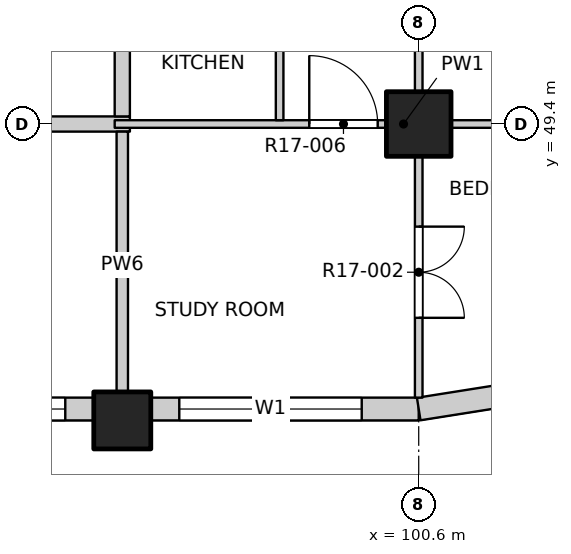
"""IFC4 building model, lengths in metres.
Left out: names, types, materials, properties, quantities, classifications, styles, units other than length and angle.
Written with IfcOpenShell. Run it as: python <this file> out.ifc"""

import sys

from ifc_helpers import new_model, si_unit, direction, frame, frame_2d, origin, origin_2d, place, context, subcontext, project, spatial, rectangle, extrude, element, fill, save


model = new_model("IFC4")
c1 = context("Model", 3, precision=1e-05, world=origin(), true_north=direction((0.0, 1.0)))
c2 = subcontext(c1, "Body", "Model", "MODEL_VIEW")
j1 = project(units=[si_unit("LENGTHUNIT", "METRE"), si_unit("PLANEANGLEUNIT", "RADIAN")], contexts=[c1])
p1 = place(None, origin())
s1 = spatial("IfcSite", under=j1, at=p1, CompositionType="ELEMENT")
p2 = place(p1, origin())
s2 = spatial("IfcBuilding", under=s1, at=p2, CompositionType="ELEMENT")
p3 = place(p2, frame((0.0, 0.0, 179.2)))
s3 = spatial("IfcBuildingStorey", under=s2, at=p3, CompositionType="ELEMENT", Elevation=179.2)
p4 = place(p3, frame((96.7, 45.5, -0.3), z_axis=(0.0, 0.0, 1.0), x_axis=(1.0, 0.0, 0.0)))
e1 = element("IfcColumn", 1, at=p4, inside=s3, PredefinedType="COLUMN", context=c2, shape_type="SweptSolid", body=[
    extrude(rectangle(XDim=0.75, YDim=0.75, at=origin_2d()), origin(), (0.0, 0.0, 1.0), 3.45),
])
p5 = place(p3, frame((100.6, 49.4, -0.3), z_axis=(0.0, 0.0, 1.0), x_axis=(1.0, 0.0, 0.0)))
e2 = element("IfcColumn", 2, at=p5, inside=s3, PredefinedType="COLUMN", context=c2, shape_type="SweptSolid", body=[
    extrude(rectangle(XDim=0.85, YDim=0.85, at=origin_2d()), origin(), (0.0, 0.0, 1.0), 3.45),
])
p6 = place(p3, frame((89.275, 45.65, 0.0), z_axis=(0.0, 0.0, 1.0), x_axis=(1.0, 0.0, 0.0)))
e3 = element("IfcWall", 3, at=p6, inside=s3, PredefinedType="SOLIDWALL", context=c2, shape_type="SweptSolid", body=[
    extrude(rectangle(XDim=7.05, YDim=0.3, at=frame_2d((3.525, 0.0))), origin(), (0.0, 0.0, 1.0), 2.7),
])
p7 = place(p6, frame((0.375, 0.0, 0.9)))
e4 = element("IfcOpeningElement", 4, at=p7, cuts=e3, PredefinedType="OPENING", context=c2, shape_type="SweptSolid", body=[
    extrude(rectangle(XDim=2.4, YDim=1.8, at=frame_2d((1.2, 0.9))), frame((0.0, 0.16, 0.0), z_axis=(0.0, -1.0, 0.0), x_axis=(1.0, 0.0, 0.0)), (0.0, 0.0, 1.0), 0.32),
])
p8 = place(p6, frame((4.275, 0.0, 0.9)))
e5 = element("IfcOpeningElement", 5, at=p8, cuts=e3, PredefinedType="OPENING", context=c2, shape_type="SweptSolid", body=[
    extrude(rectangle(XDim=2.4, YDim=1.8, at=frame_2d((1.2, 0.9))), frame((0.0, 0.16, 0.0), z_axis=(0.0, -1.0, 0.0), x_axis=(1.0, 0.0, 0.0)), (0.0, 0.0, 1.0), 0.32),
])
p9 = place(p3, frame((97.075, 45.65, 0.0), z_axis=(0.0, 0.0, 1.0), x_axis=(1.0, 0.0, 0.0)))
e6 = element("IfcWall", 6, at=p9, inside=s3, PredefinedType="SOLIDWALL", context=c2, shape_type="SweptSolid", body=[
    extrude(rectangle(XDim=3.525, YDim=0.3, at=frame_2d((1.763, 0.0))), origin(), (0.0, 0.0, 1.0), 2.7),
])
p10 = place(p9, frame((0.375, 0.0, 0.9)))
e7 = element("IfcOpeningElement", 7, at=p10, cuts=e6, PredefinedType="OPENING", context=c2, shape_type="SweptSolid", body=[
    extrude(rectangle(XDim=2.4, YDim=1.8, at=frame_2d((1.2, 0.9))), frame((0.0, 0.16, 0.0), z_axis=(0.0, -1.0, 0.0), x_axis=(1.0, 0.0, 0.0)), (0.0, 0.0, 1.0), 0.32),
])
p11 = place(p3, frame((100.6, 45.65, 0.0), z_axis=(0.0, 0.0, 1.0), x_axis=(0.987678452879, 0.156496880861, 0.0)))
e8 = element("IfcWall", 8, at=p11, inside=s3, PredefinedType="SOLIDWALL", context=c2, shape_type="SweptSolid", body=[
    extrude(rectangle(XDim=1.173, YDim=0.3, at=frame_2d((0.586, 0.0))), origin(), (0.0, 0.0, 1.0), 2.7),
])
p12 = place(p3, frame((73.2, 49.4, 0.0), z_axis=(0.0, 0.0, 1.0), x_axis=(1.0, 0.0, 0.0)))
e9 = element("IfcWall", 9, at=p12, inside=s3, PredefinedType="PARTITIONING", context=c2, shape_type="SweptSolid", body=[
    extrude(rectangle(XDim=23.6, YDim=0.2, at=frame_2d((11.8, 0.0))), origin(), (0.0, 0.0, 1.0), 3.15),
])
p13 = place(p12, frame((7.3, 0.0, 0.0)))
e10 = element("IfcOpeningElement", 10, at=p13, cuts=e9, PredefinedType="OPENING", context=c2, shape_type="SweptSolid", body=[
    extrude(rectangle(XDim=1.2, YDim=2.1, at=frame_2d((0.6, 1.05))), frame((0.0, 0.11, 0.0), z_axis=(0.0, -1.0, 0.0), x_axis=(1.0, 0.0, 0.0)), (0.0, 0.0, 1.0), 0.22),
])
p14 = place(p12, frame((20.125, 0.0, 0.0)))
e11 = element("IfcOpeningElement", 11, at=p14, cuts=e9, PredefinedType="OPENING", context=c2, shape_type="SweptSolid", body=[
    extrude(rectangle(XDim=1.2, YDim=2.1, at=frame_2d((0.6, 1.05))), frame((0.0, 0.11, 0.0), z_axis=(0.0, -1.0, 0.0), x_axis=(1.0, 0.0, 0.0)), (0.0, 0.0, 1.0), 0.22),
])
p15 = place(p3, frame((96.6, 49.4, 0.0), z_axis=(0.0, 0.0, 1.0), x_axis=(1.0, 0.0, 0.0)))
e12 = element("IfcWall", 12, at=p15, inside=s3, PredefinedType="PARTITIONING", context=c2, shape_type="SweptSolid", body=[
    extrude(rectangle(XDim=7.6, YDim=0.1, at=frame_2d((3.8, 0.0))), origin(), (0.0, 0.0, 1.0), 3.15),
])
p16 = place(p15, frame((2.56, 0.0, 0.0)))
e13 = element("IfcOpeningElement", 13, at=p16, cuts=e12, PredefinedType="OPENING", context=c2, shape_type="SweptSolid", body=[
    extrude(rectangle(XDim=0.9, YDim=2.1, at=frame_2d((0.45, 1.05))), frame((0.0, 0.06, 0.0), z_axis=(0.0, -1.0, 0.0), x_axis=(1.0, 0.0, 0.0)), (0.0, 0.0, 1.0), 0.12),
])
p17 = place(p3, frame((96.7, 45.8, 0.0), z_axis=(0.0, 0.0, 1.0), x_axis=(0.0, 1.0, 0.0)))
e14 = element("IfcWall", 14, at=p17, inside=s3, PredefinedType="PARTITIONING", context=c2, shape_type="SweptSolid", body=[
    extrude(rectangle(XDim=3.5, YDim=0.15, at=frame_2d((1.75, 0.0))), origin(), (0.0, 0.0, 1.0), 3.15),
])
p18 = place(p3, frame((96.7, 49.5, 0.0), z_axis=(0.0, 0.0, 1.0), x_axis=(0.0, 1.0, 0.0)))
e15 = element("IfcWall", 15, at=p18, inside=s3, PredefinedType="PARTITIONING", context=c2, shape_type="SweptSolid", body=[
    extrude(rectangle(XDim=34.7, YDim=0.2, at=frame_2d((17.35, 0.0))), origin(), (0.0, 0.0, 1.0), 3.15),
])
p19 = place(p18, frame((6.875, 0.0, 0.0)))
e16 = element("IfcOpeningElement", 16, at=p19, cuts=e15, PredefinedType="OPENING", context=c2, shape_type="SweptSolid", body=[
    extrude(rectangle(XDim=1.0, YDim=2.1, at=frame_2d((0.5, 1.05))), frame((0.0, 0.11, 0.0), z_axis=(0.0, -1.0, 0.0), x_axis=(1.0, 0.0, 0.0)), (0.0, 0.0, 1.0), 0.22),
])
p20 = place(p18, frame((21.775, 0.0, 0.0)))
e17 = element("IfcOpeningElement", 17, at=p20, cuts=e15, PredefinedType="OPENING", context=c2, shape_type="SweptSolid", body=[
    extrude(rectangle(XDim=1.0, YDim=2.1, at=frame_2d((0.5, 1.05))), frame((0.0, 0.11, 0.0), z_axis=(0.0, -1.0, 0.0), x_axis=(1.0, 0.0, 0.0)), (0.0, 0.0, 1.0), 0.22),
])
p21 = place(p18, frame((27.725, 0.0, 0.0)))
e18 = element("IfcOpeningElement", 18, at=p21, cuts=e15, PredefinedType="OPENING", context=c2, shape_type="SweptSolid", body=[
    extrude(rectangle(XDim=1.0, YDim=2.1, at=frame_2d((0.5, 1.05))), frame((0.0, 0.11, 0.0), z_axis=(0.0, -1.0, 0.0), x_axis=(1.0, 0.0, 0.0)), (0.0, 0.0, 1.0), 0.22),
])
p22 = place(p3, frame((98.77, 49.45, 0.0), z_axis=(0.0, 0.0, 1.0), x_axis=(0.0, 1.0, 0.0)))
e19 = element("IfcWall", 19, at=p22, inside=s3, PredefinedType="PARTITIONING", context=c2, shape_type="SweptSolid", body=[
    extrude(rectangle(XDim=5.6, YDim=0.1, at=frame_2d((2.8, 0.0))), origin(), (0.0, 0.0, 1.0), 3.15),
])
p23 = place(p22, frame((1.15, 0.0, 0.0)))
e20 = element("IfcOpeningElement", 20, at=p23, cuts=e19, PredefinedType="OPENING", context=c2, shape_type="SweptSolid", body=[
    extrude(rectangle(XDim=0.9, YDim=2.1, at=frame_2d((0.45, 1.05))), frame((0.0, 0.06, 0.0), z_axis=(0.0, -1.0, 0.0), x_axis=(1.0, 0.0, 0.0)), (0.0, 0.0, 1.0), 0.12),
])
p24 = place(p22, frame((4.0, 0.0, 0.0)))
e21 = element("IfcOpeningElement", 21, at=p24, cuts=e19, PredefinedType="OPENING", context=c2, shape_type="SweptSolid", body=[
    extrude(rectangle(XDim=0.9, YDim=2.1, at=frame_2d((0.45, 1.05))), frame((0.0, 0.06, 0.0), z_axis=(0.0, -1.0, 0.0), x_axis=(1.0, 0.0, 0.0)), (0.0, 0.0, 1.0), 0.12),
])
p25 = place(p3, frame((100.6, 45.8, 0.0), z_axis=(0.0, 0.0, 1.0), x_axis=(0.0, 1.0, 0.0)))
e22 = element("IfcWall", 22, at=p25, inside=s3, PredefinedType="PARTITIONING", context=c2, shape_type="SweptSolid", body=[
    extrude(rectangle(XDim=38.4, YDim=0.1, at=frame_2d((19.2, 0.0))), origin(), (0.0, 0.0, 1.0), 3.15),
])
p26 = place(p25, frame((1.05, 0.0, 0.0)))
e23 = element("IfcOpeningElement", 23, at=p26, cuts=e22, PredefinedType="OPENING", context=c2, shape_type="SweptSolid", body=[
    extrude(rectangle(XDim=1.2, YDim=2.1, at=frame_2d((0.6, 1.05))), frame((0.0, 0.06, 0.0), z_axis=(0.0, -1.0, 0.0), x_axis=(1.0, 0.0, 0.0)), (0.0, 0.0, 1.0), 0.12),
])
p27 = place(p25, frame((5.1, 0.0, 0.0)))
e24 = element("IfcOpeningElement", 24, at=p27, cuts=e22, PredefinedType="OPENING", context=c2, shape_type="SweptSolid", body=[
    extrude(rectangle(XDim=0.9, YDim=2.1, at=frame_2d((0.45, 1.05))), frame((0.0, 0.06, 0.0), z_axis=(0.0, -1.0, 0.0), x_axis=(1.0, 0.0, 0.0)), (0.0, 0.0, 1.0), 0.12),
])
p28 = place(p25, frame((9.0, 0.0, 0.0)))
e25 = element("IfcOpeningElement", 25, at=p28, cuts=e22, PredefinedType="OPENING", context=c2, shape_type="SweptSolid", body=[
    extrude(rectangle(XDim=0.9, YDim=2.1, at=frame_2d((0.45, 1.05))), frame((0.0, 0.06, 0.0), z_axis=(0.0, -1.0, 0.0), x_axis=(1.0, 0.0, 0.0)), (0.0, 0.0, 1.0), 0.12),
])
p29 = place(p25, frame((12.9, 0.0, 0.0)))
e26 = element("IfcOpeningElement", 26, at=p29, cuts=e22, PredefinedType="OPENING", context=c2, shape_type="SweptSolid", body=[
    extrude(rectangle(XDim=0.9, YDim=2.1, at=frame_2d((0.45, 1.05))), frame((0.0, 0.06, 0.0), z_axis=(0.0, -1.0, 0.0), x_axis=(1.0, 0.0, 0.0)), (0.0, 0.0, 1.0), 0.12),
])
p30 = place(p25, frame((19.725, 0.0, 0.0)))
e27 = element("IfcOpeningElement", 27, at=p30, cuts=e22, PredefinedType="OPENING", context=c2, shape_type="SweptSolid", body=[
    extrude(rectangle(XDim=1.2, YDim=2.1, at=frame_2d((0.6, 1.05))), frame((0.0, 0.06, 0.0), z_axis=(0.0, -1.0, 0.0), x_axis=(1.0, 0.0, 0.0)), (0.0, 0.0, 1.0), 0.12),
])
p31 = place(p25, frame((24.6, 0.0, 0.0)))
e28 = element("IfcOpeningElement", 28, at=p31, cuts=e22, PredefinedType="OPENING", context=c2, shape_type="SweptSolid", body=[
    extrude(rectangle(XDim=0.9, YDim=2.1, at=frame_2d((0.45, 1.05))), frame((0.0, 0.06, 0.0), z_axis=(0.0, -1.0, 0.0), x_axis=(1.0, 0.0, 0.0)), (0.0, 0.0, 1.0), 0.12),
])
p32 = place(p25, frame((28.5, 0.0, 0.0)))
e29 = element("IfcOpeningElement", 29, at=p32, cuts=e22, PredefinedType="OPENING", context=c2, shape_type="SweptSolid", body=[
    extrude(rectangle(XDim=0.9, YDim=2.1, at=frame_2d((0.45, 1.05))), frame((0.0, 0.06, 0.0), z_axis=(0.0, -1.0, 0.0), x_axis=(1.0, 0.0, 0.0)), (0.0, 0.0, 1.0), 0.12),
])
p33 = place(p25, frame((32.4, 0.0, 0.0)))
e30 = element("IfcOpeningElement", 30, at=p33, cuts=e22, PredefinedType="OPENING", context=c2, shape_type="SweptSolid", body=[
    extrude(rectangle(XDim=0.9, YDim=2.1, at=frame_2d((0.45, 1.05))), frame((0.0, 0.06, 0.0), z_axis=(0.0, -1.0, 0.0), x_axis=(1.0, 0.0, 0.0)), (0.0, 0.0, 1.0), 0.12),
])
p34 = place(p25, frame((36.15, 0.0, 0.0)))
e31 = element("IfcOpeningElement", 31, at=p34, cuts=e22, PredefinedType="OPENING", context=c2, shape_type="SweptSolid", body=[
    extrude(rectangle(XDim=1.2, YDim=2.1, at=frame_2d((0.6, 1.05))), frame((0.0, 0.06, 0.0), z_axis=(0.0, -1.0, 0.0), x_axis=(1.0, 0.0, 0.0)), (0.0, 0.0, 1.0), 0.12),
])
p35 = place(p8, origin())
e32 = element("IfcWindow", 32, at=p35, inside=s3, PartitioningType="DOUBLE_PANEL_VERTICAL", PredefinedType="WINDOW", context=c2, shape_type="SweptSolid", body=[
    extrude(rectangle(XDim=2.4, YDim=1.8, at=frame_2d((1.2, 0.9))), frame((0.0, 0.03, 0.0), z_axis=(0.0, -1.0, 0.0), x_axis=(1.0, 0.0, 0.0)), (0.0, 0.0, 1.0), 0.06),
])
fill(e5, e32)
p36 = place(p10, origin())
e33 = element("IfcWindow", 33, at=p36, inside=s3, PartitioningType="DOUBLE_PANEL_VERTICAL", PredefinedType="WINDOW", context=c2, shape_type="SweptSolid", body=[
    extrude(rectangle(XDim=2.4, YDim=1.8, at=frame_2d((1.2, 0.9))), frame((0.0, 0.03, 0.0), z_axis=(0.0, -1.0, 0.0), x_axis=(1.0, 0.0, 0.0)), (0.0, 0.0, 1.0), 0.06),
])
fill(e7, e33)
p37 = place(p26, origin())
e34 = element("IfcDoor", 34, at=p37, inside=s3, OperationType="DOUBLE_DOOR_SINGLE_SWING", PredefinedType="DOOR", context=c2, shape_type="SweptSolid", body=[
    extrude(rectangle(XDim=1.2, YDim=2.1, at=frame_2d((0.6, 1.05))), frame((0.0, 0.025, 0.0), z_axis=(0.0, -1.0, 0.0), x_axis=(1.0, 0.0, 0.0)), (0.0, 0.0, 1.0), 0.05),
])
fill(e23, e34)
p38 = place(p16, origin())
e35 = element("IfcDoor", 35, at=p38, inside=s3, OperationType="SINGLE_SWING_LEFT", PredefinedType="DOOR", context=c2, shape_type="SweptSolid", body=[
    extrude(rectangle(XDim=0.9, YDim=2.1, at=frame_2d((0.45, 1.05))), frame((0.0, 0.025, 0.0), z_axis=(0.0, -1.0, 0.0), x_axis=(1.0, 0.0, 0.0)), (0.0, 0.0, 1.0), 0.05),
])
fill(e13, e35)
save(model, sys.argv[1])
